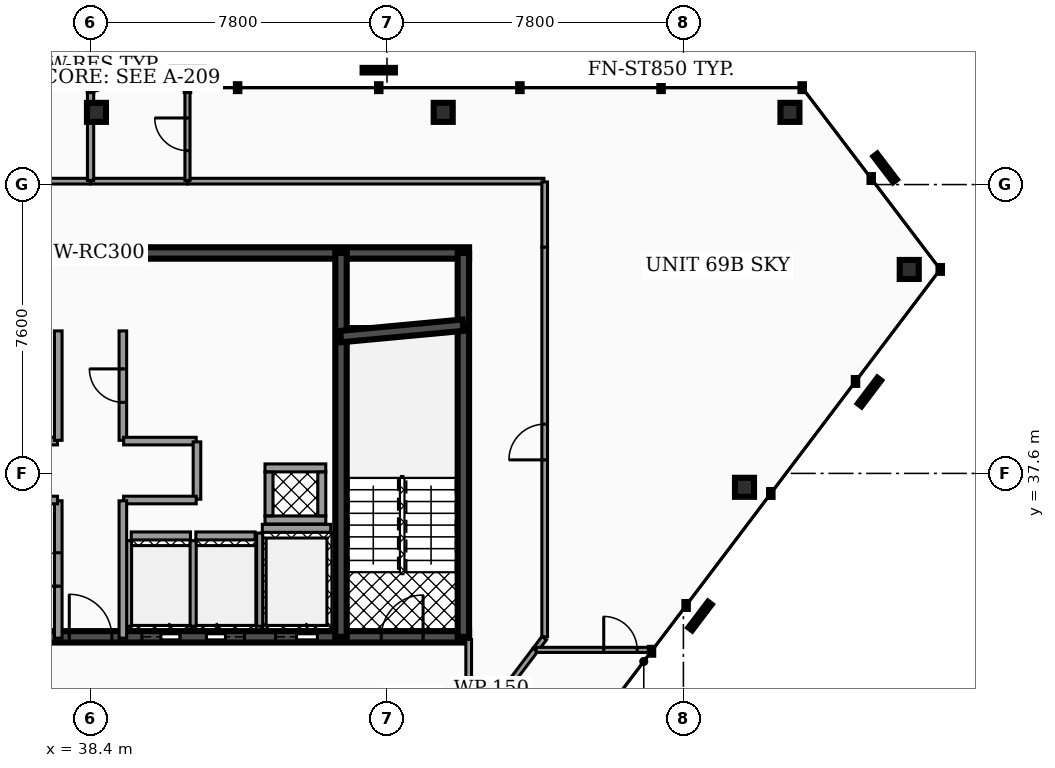
"""IFC4 building model, lengths in metres.
Left out: names, types, materials, properties, quantities, classifications, styles, units other than length and angle.
Written with IfcOpenShell. Run it as: python <this file> out.ifc"""

import sys

from ifc_helpers import new_model, si_unit, direction, frame, frame_2d, origin, origin_2d, place, context, subcontext, project, spatial, rectangle, hollow_rectangle, extrude, element, fill, save


model = new_model("IFC4")
c1 = context("Model", 3, precision=1e-05, world=origin(), true_north=direction((0.0, 1.0)))
c2 = subcontext(c1, "Body", "Model", "MODEL_VIEW")
j1 = project(units=[si_unit("LENGTHUNIT", "METRE"), si_unit("PLANEANGLEUNIT", "RADIAN")], contexts=[c1])
p1 = place(None, origin())
s1 = spatial("IfcSite", under=j1, at=p1, CompositionType="ELEMENT")
p2 = place(p1, origin())
s2 = spatial("IfcBuilding", under=s1, at=p2, CompositionType="ELEMENT")
p3 = place(p2, frame((0.0, 0.0, 272.0)))
s3 = spatial("IfcBuildingStorey", under=s2, at=p3, CompositionType="ELEMENT", Elevation=272.0)
p4 = place(p3, frame((28.5, 43.4, 0.0), z_axis=(0.0, 0.0, 1.0), x_axis=(1.0, 0.0, 0.0)))
e1 = element("IfcWall", 1, at=p4, inside=s3, PredefinedType="SHEAR", context=c2, shape_type="SweptSolid", body=[
    extrude(rectangle(XDim=19.86, YDim=0.3, at=frame_2d((9.93, 0.0))), origin(), (0.0, 0.0, 1.0), 3.18),
])
p5 = place(p3, frame((28.5, 33.3, 0.0), z_axis=(0.0, 0.0, 1.0), x_axis=(1.0, 0.0, 0.0)))
e2 = element("IfcWall", 2, at=p5, inside=s3, PredefinedType="SHEAR", context=c2, shape_type="SweptSolid", body=[
    extrude(rectangle(XDim=19.86, YDim=0.3, at=frame_2d((9.93, 0.0))), origin(), (0.0, 0.0, 1.0), 3.18),
])
p6 = place(p5, frame((3.93, 0.0, 0.0)))
e3 = element("IfcOpeningElement", 3, at=p6, cuts=e2, PredefinedType="OPENING", context=c2, shape_type="SweptSolid", body=[
    extrude(rectangle(XDim=1.1, YDim=2.15, at=frame_2d((0.55, 1.075))), frame((0.0, 0.16, 0.0), z_axis=(0.0, -1.0, 0.0), x_axis=(1.0, 0.0, 0.0)), (0.0, 0.0, 1.0), 0.32),
])
p7 = place(p5, frame((14.77, 0.0, 0.0)))
e4 = element("IfcOpeningElement", 4, at=p7, cuts=e2, PredefinedType="OPENING", context=c2, shape_type="SweptSolid", body=[
    extrude(rectangle(XDim=1.1, YDim=2.15, at=frame_2d((0.55, 1.075))), frame((0.0, 0.16, 0.0), z_axis=(0.0, -1.0, 0.0), x_axis=(1.0, 0.0, 0.0)), (0.0, 0.0, 1.0), 0.32),
])
p8 = place(p5, frame((11.25, 0.0, 0.0)))
e5 = element("IfcOpeningElement", 5, at=p8, cuts=e2, PredefinedType="OPENING", context=c2, shape_type="SweptSolid", body=[
    extrude(rectangle(XDim=1.0, YDim=2.1, at=frame_2d((0.5, 1.05))), frame((0.0, 0.16, 0.0), z_axis=(0.0, -1.0, 0.0), x_axis=(1.0, 0.0, 0.0)), (0.0, 0.0, 1.0), 0.32),
])
p9 = place(p5, frame((12.95, 0.0, 0.0)))
e6 = element("IfcOpeningElement", 6, at=p9, cuts=e2, PredefinedType="OPENING", context=c2, shape_type="SweptSolid", body=[
    extrude(rectangle(XDim=1.0, YDim=2.1, at=frame_2d((0.5, 1.05))), frame((0.0, 0.16, 0.0), z_axis=(0.0, -1.0, 0.0), x_axis=(1.0, 0.0, 0.0)), (0.0, 0.0, 1.0), 0.32),
])
p10 = place(p5, frame((5.85, 0.0, 0.0)))
e7 = element("IfcOpeningElement", 7, at=p10, cuts=e2, PredefinedType="OPENING", context=c2, shape_type="SweptSolid", body=[
    extrude(rectangle(XDim=1.0, YDim=2.1, at=frame_2d((0.5, 1.05))), frame((0.0, 0.16, 0.0), z_axis=(0.0, -1.0, 0.0), x_axis=(1.0, 0.0, 0.0)), (0.0, 0.0, 1.0), 0.32),
])
p11 = place(p5, frame((1.21, 0.0, 0.0)))
e8 = element("IfcOpeningElement", 8, at=p11, cuts=e2, PredefinedType="OPENING", context=c2, shape_type="SweptSolid", body=[
    extrude(rectangle(XDim=1.1, YDim=2.2, at=frame_2d((0.55, 1.1))), frame((0.0, 0.16, 0.0), z_axis=(0.0, -1.0, 0.0), x_axis=(1.0, 0.0, 0.0)), (0.0, 0.0, 1.0), 0.32),
])
p12 = place(p5, frame((9.34, 0.0, 0.0)))
e9 = element("IfcOpeningElement", 9, at=p12, cuts=e2, PredefinedType="OPENING", context=c2, shape_type="SweptSolid", body=[
    extrude(rectangle(XDim=1.12, YDim=2.05, at=frame_2d((0.56, 1.025))), frame((0.0, 0.16, 0.0), z_axis=(0.0, -1.0, 0.0), x_axis=(1.0, 0.0, 0.0)), (0.0, 0.0, 1.0), 0.32),
])
p13 = place(p5, frame((17.55, 0.0, 0.0)))
e10 = element("IfcOpeningElement", 10, at=p13, cuts=e2, PredefinedType="OPENING", context=c2, shape_type="SweptSolid", body=[
    extrude(rectangle(XDim=1.1, YDim=2.2, at=frame_2d((0.55, 1.1))), frame((0.0, 0.16, 0.0), z_axis=(0.0, -1.0, 0.0), x_axis=(1.0, 0.0, 0.0)), (0.0, 0.0, 1.0), 0.32),
])
for number, where, z_axis, x_axis in (
    (11, (44.99, 33.3, 0.0), (0.0, 0.0, 1.0), (0.0, 1.0, 0.0)),
    (12, (48.21, 33.3, 0.0), (0.0, 0.0, 1.0), (0.0, 1.0, 0.0)),
):
    element("IfcWall", number, at=place(p3, frame(where, z_axis=z_axis, x_axis=x_axis)), inside=s3, PredefinedType="SHEAR", context=c2, shape_type="SweptSolid", body=[
        extrude(rectangle(XDim=10.1, YDim=0.3, at=frame_2d((5.05, 0.0))), origin(), (0.0, 0.0, 1.0), 3.18),
    ])
p14 = place(p3, frame((44.98, 41.2, 0.0), z_axis=(0.0, 0.0, 1.0), x_axis=(0.995686468965, 0.09278176286, 0.0)))
e13 = element("IfcWall", 13, at=p14, inside=s3, PredefinedType="SHEAR", context=c2, shape_type="SweptSolid", body=[
    extrude(rectangle(XDim=3.234, YDim=0.3, at=frame_2d((1.617, 0.0))), origin(), (0.0, 0.0, 1.0), 3.18),
])
for number, where, z_axis, x_axis in (
    (14, (56.804, 47.1, 0.0), (0.0, 0.0, 1.0), (1.0, 0.0, 0.0)),
    (15, (47.679, 47.1, 0.0), (0.0, 0.0, 1.0), (1.0, 0.0, 0.0)),
    (16, (38.555, 47.1, 0.0), (0.0, 0.0, 1.0), (1.0, 0.0, 0.0)),
    (17, (55.608, 37.234, 0.0), (0.0, 0.0, 1.0), (1.0, 0.0, 0.0)),
    (18, (59.943, 42.967, 0.0), (0.0, 0.0, 1.0), (1.0, 0.0, 0.0)),
):
    element("IfcColumn", number, at=place(p3, frame(where, z_axis=z_axis, x_axis=x_axis)), inside=s3, PredefinedType="COLUMN", context=c2, shape_type="SweptSolid", body=[
        extrude(hollow_rectangle(XDim=0.5, YDim=0.5, WallThickness=0.025, at=origin_2d()), origin(), (0.0, 0.0, 1.0), 3.18),
    ])
p15 = place(p3, frame((42.92, 36.155, 0.0), z_axis=(0.0, 0.0, 1.0), x_axis=(1.0, 0.0, 0.0)))
e19 = element("IfcWall", 19, at=p15, inside=s3, PredefinedType="SOLIDWALL", context=c2, shape_type="SweptSolid", body=[
    extrude(rectangle(XDim=1.8, YDim=0.21, at=frame_2d((0.9, 0.0))), origin(), (0.0, 0.0, 1.0), 3.18),
])
p16 = place(p3, frame((42.85, 33.58, 0.0), z_axis=(0.0, 0.0, 1.0), x_axis=(0.0, 1.0, 0.0)))
e20 = element("IfcWall", 20, at=p16, inside=s3, PredefinedType="SOLIDWALL", context=c2, shape_type="SweptSolid", body=[
    extrude(rectangle(XDim=2.45, YDim=0.16, at=frame_2d((1.225, 0.0))), origin(), (0.0, 0.0, 1.0), 3.18),
])
p17 = place(p3, frame((39.47, 35.955, 0.0), z_axis=(0.0, 0.0, 1.0), x_axis=(1.0, 0.0, 0.0)))
e21 = element("IfcWall", 21, at=p17, inside=s3, PredefinedType="SOLIDWALL", context=c2, shape_type="SweptSolid", body=[
    extrude(rectangle(XDim=1.56, YDim=0.21, at=frame_2d((0.78, 0.0))), origin(), (0.0, 0.0, 1.0), 3.18),
])
for number, where, z_axis, x_axis in (
    (22, (39.4, 33.58, 0.0), (0.0, 0.0, 1.0), (0.0, 1.0, 0.0)),
    (23, (41.1, 33.58, 0.0), (0.0, 0.0, 1.0), (0.0, 1.0, 0.0)),
):
    element("IfcWall", number, at=place(p3, frame(where, z_axis=z_axis, x_axis=x_axis)), inside=s3, PredefinedType="SOLIDWALL", context=c2, shape_type="SweptSolid", body=[
        extrude(rectangle(XDim=2.25, YDim=0.16, at=frame_2d((1.125, 0.0))), origin(), (0.0, 0.0, 1.0), 3.18),
    ])
p18 = place(p3, frame((41.17, 35.955, 0.0), z_axis=(0.0, 0.0, 1.0), x_axis=(1.0, 0.0, 0.0)))
e24 = element("IfcWall", 24, at=p18, inside=s3, PredefinedType="SOLIDWALL", context=c2, shape_type="SweptSolid", body=[
    extrude(rectangle(XDim=1.56, YDim=0.21, at=frame_2d((0.78, 0.0))), origin(), (0.0, 0.0, 1.0), 3.18),
])
for number, where, z_axis, x_axis in (
    (25, (42.99, 36.375, 0.0), (0.0, 0.0, 1.0), (1.0, 0.0, 0.0)),
    (26, (42.99, 37.745, 0.0), (0.0, 0.0, 1.0), (1.0, 0.0, 0.0)),
):
    element("IfcWall", number, at=place(p3, frame(where, z_axis=z_axis, x_axis=x_axis)), inside=s3, PredefinedType="SOLIDWALL", context=c2, shape_type="SweptSolid", body=[
        extrude(rectangle(XDim=1.6, YDim=0.21, at=frame_2d((0.8, 0.0))), origin(), (0.0, 0.0, 1.0), 3.18),
    ])
for number, where, z_axis, x_axis in (
    (27, (43.095, 36.485, 0.0), (0.0, 0.0, 1.0), (0.0, 1.0, 0.0)),
    (28, (44.485, 36.485, 0.0), (0.0, 0.0, 1.0), (0.0, 1.0, 0.0)),
):
    element("IfcWall", number, at=place(p3, frame(where, z_axis=z_axis, x_axis=x_axis)), inside=s3, PredefinedType="SOLIDWALL", context=c2, shape_type="SweptSolid", body=[
        extrude(rectangle(XDim=1.15, YDim=0.21, at=frame_2d((0.575, 0.0))), origin(), (0.0, 0.0, 1.0), 3.18),
    ])
p19 = place(p3, frame((37.55, 33.265, 0.0), z_axis=(0.0, 0.0, 1.0), x_axis=(0.0, 1.0, 0.0)))
e29 = element("IfcWall", 29, at=p19, inside=s3, PredefinedType="PARTITIONING", context=c2, shape_type="SweptSolid", body=[
    extrude(rectangle(XDim=3.615, YDim=0.2, at=frame_2d((1.808, 0.0))), origin(), (0.0, 0.0, 1.0), 2.235),
])
p20 = place(p19, frame((1.367, 0.0, 0.0)))
e30 = element("IfcOpeningElement", 30, at=p20, cuts=e29, PredefinedType="OPENING", context=c2, shape_type="SweptSolid", body=[
    extrude(rectangle(XDim=0.88, YDim=2.05, at=frame_2d((0.44, 1.025))), frame((0.0, 0.11, 0.0), z_axis=(0.0, -1.0, 0.0), x_axis=(1.0, 0.0, 0.0)), (0.0, 0.0, 1.0), 0.22),
])
for number, where, z_axis, x_axis in (
    (31, (35.82, 36.9, 0.0), (0.0, 0.0, 1.0), (1.0, 0.0, 0.0)),
    (32, (35.82, 38.45, 0.0), (0.0, 0.0, 1.0), (1.0, 0.0, 0.0)),
):
    element("IfcWall", number, at=place(p3, frame(where, z_axis=z_axis, x_axis=x_axis)), inside=s3, PredefinedType="PARTITIONING", context=c2, shape_type="SweptSolid", body=[
        extrude(rectangle(XDim=1.71, YDim=0.2, at=frame_2d((0.855, 0.0))), origin(), (0.0, 0.0, 1.0), 2.235),
    ])
p21 = place(p3, frame((37.55, 38.47, 0.0), z_axis=(0.0, 0.0, 1.0), x_axis=(0.0, 1.0, 0.0)))
e33 = element("IfcWall", 33, at=p21, inside=s3, PredefinedType="PARTITIONING", context=c2, shape_type="SweptSolid", body=[
    extrude(rectangle(XDim=2.88, YDim=0.2, at=frame_2d((1.44, 0.0))), origin(), (0.0, 0.0, 1.0), 2.235),
])
p22 = place(p3, frame((39.25, 38.47, 0.0), z_axis=(0.0, 0.0, 1.0), x_axis=(0.0, 1.0, 0.0)))
e34 = element("IfcWall", 34, at=p22, inside=s3, PredefinedType="PARTITIONING", context=c2, shape_type="SweptSolid", body=[
    extrude(rectangle(XDim=2.88, YDim=0.2, at=frame_2d((1.44, 0.0))), origin(), (0.0, 0.0, 1.0), 2.235),
])
p23 = place(p22, frame((1.0, 0.0, 0.0)))
e35 = element("IfcOpeningElement", 35, at=p23, cuts=e34, PredefinedType="OPENING", context=c2, shape_type="SweptSolid", body=[
    extrude(rectangle(XDim=0.88, YDim=2.05, at=frame_2d((0.44, 1.025))), frame((0.0, 0.11, 0.0), z_axis=(0.0, -1.0, 0.0), x_axis=(1.0, 0.0, 0.0)), (0.0, 0.0, 1.0), 0.22),
])
p24 = place(p3, frame((39.27, 38.45, 0.0), z_axis=(0.0, 0.0, 1.0), x_axis=(1.0, 0.0, 0.0)))
e36 = element("IfcWall", 36, at=p24, inside=s3, PredefinedType="PARTITIONING", context=c2, shape_type="SweptSolid", body=[
    extrude(rectangle(XDim=1.91, YDim=0.2, at=frame_2d((0.955, 0.0))), origin(), (0.0, 0.0, 1.0), 2.235),
])
p25 = place(p3, frame((41.2, 36.92, 0.0), z_axis=(0.0, 0.0, 1.0), x_axis=(0.0, 1.0, 0.0)))
e37 = element("IfcWall", 37, at=p25, inside=s3, PredefinedType="PARTITIONING", context=c2, shape_type="SweptSolid", body=[
    extrude(rectangle(XDim=1.51, YDim=0.2, at=frame_2d((0.755, 0.0))), origin(), (0.0, 0.0, 1.0), 2.235),
])
p26 = place(p3, frame((39.27, 36.9, 0.0), z_axis=(0.0, 0.0, 1.0), x_axis=(1.0, 0.0, 0.0)))
e38 = element("IfcWall", 38, at=p26, inside=s3, PredefinedType="PARTITIONING", context=c2, shape_type="SweptSolid", body=[
    extrude(rectangle(XDim=1.91, YDim=0.2, at=frame_2d((0.955, 0.0))), origin(), (0.0, 0.0, 1.0), 2.235),
])
p27 = place(p3, frame((39.25, 33.265, 0.0), z_axis=(0.0, 0.0, 1.0), x_axis=(0.0, 1.0, 0.0)))
e39 = element("IfcWall", 39, at=p27, inside=s3, PredefinedType="PARTITIONING", context=c2, shape_type="SweptSolid", body=[
    extrude(rectangle(XDim=3.615, YDim=0.2, at=frame_2d((1.808, 0.0))), origin(), (0.0, 0.0, 1.0), 2.235),
])
p28 = place(p3, frame((48.35, 30.643, 0.0), z_axis=(0.0, 0.0, 1.0), x_axis=(0.0, 1.0, 0.0)))
e40 = element("IfcWall", 40, at=p28, inside=s3, PredefinedType="PARTITIONING", context=c2, shape_type="SweptSolid", body=[
    extrude(rectangle(XDim=2.587, YDim=0.15, at=frame_2d((1.294, 0.0))), origin(), (0.0, 0.0, 1.0), 2.235),
])
p29 = place(p3, frame((35.855, 45.29, 0.0), z_axis=(0.0, 0.0, 1.0), x_axis=(1.0, 0.0, 0.0)))
e41 = element("IfcWall", 41, at=p29, inside=s3, PredefinedType="PARTITIONING", context=c2, shape_type="SweptSolid", body=[
    extrude(rectangle(XDim=2.54, YDim=0.15, at=frame_2d((1.27, 0.0))), origin(), (0.0, 0.0, 1.0), 2.235),
])
p30 = place(p3, frame((40.955, 45.29, 0.0), z_axis=(0.0, 0.0, 1.0), x_axis=(1.0, 0.0, 0.0)))
e42 = element("IfcWall", 42, at=p30, inside=s3, PredefinedType="PARTITIONING", context=c2, shape_type="SweptSolid", body=[
    extrude(rectangle(XDim=9.375, YDim=0.15, at=frame_2d((4.688, 0.0))), origin(), (0.0, 0.0, 1.0), 2.235),
])
p31 = place(p3, frame((50.35, 43.55, 0.0), z_axis=(0.0, 0.0, 1.0), x_axis=(0.0, 1.0, 0.0)))
e43 = element("IfcWall", 43, at=p31, inside=s3, PredefinedType="PARTITIONING", context=c2, shape_type="SweptSolid", body=[
    extrude(rectangle(XDim=1.72, YDim=0.15, at=frame_2d((0.86, 0.0))), origin(), (0.0, 0.0, 1.0), 2.235),
])
p32 = place(p3, frame((50.35, 33.302, 0.0), z_axis=(0.0, 0.0, 1.0), x_axis=(0.0, 1.0, 0.0)))
e44 = element("IfcWall", 44, at=p32, inside=s3, PredefinedType="PARTITIONING", context=c2, shape_type="SweptSolid", body=[
    extrude(rectangle(XDim=10.248, YDim=0.15, at=frame_2d((5.124, 0.0))), origin(), (0.0, 0.0, 1.0), 2.235),
])
p33 = place(p32, frame((4.654, 0.0, 0.0)))
e45 = element("IfcOpeningElement", 45, at=p33, cuts=e44, PredefinedType="OPENING", context=c2, shape_type="SweptSolid", body=[
    extrude(rectangle(XDim=0.94, YDim=2.05, at=frame_2d((0.47, 1.025))), frame((0.0, 0.085, 0.0), z_axis=(0.0, -1.0, 0.0), x_axis=(1.0, 0.0, 0.0)), (0.0, 0.0, 1.0), 0.17),
])
p34 = place(p3, frame((50.107, 32.96, 0.0), z_axis=(0.0, 0.0, 1.0), x_axis=(0.602950173728, 0.797778846549, 0.0)))
e46 = element("IfcWall", 46, at=p34, inside=s3, PredefinedType="PARTITIONING", context=c2, shape_type="SweptSolid", body=[
    extrude(rectangle(XDim=0.384, YDim=0.15, at=frame_2d((0.192, 0.0))), origin(), (0.0, 0.0, 1.0), 2.235),
])
p35 = place(p3, frame((48.362, 30.654, 0.0), z_axis=(0.0, 0.0, 1.0), x_axis=(0.603189668488, 0.79759778324, 0.0)))
e47 = element("IfcWall", 47, at=p35, inside=s3, PredefinedType="PARTITIONING", context=c2, shape_type="SweptSolid", body=[
    extrude(rectangle(XDim=2.886, YDim=0.15, at=frame_2d((1.443, 0.0))), origin(), (0.0, 0.0, 1.0), 2.235),
])
p36 = place(p3, frame((38.405, 45.29, 0.0), z_axis=(0.0, 0.0, 1.0), x_axis=(1.0, 0.0, 0.0)))
e48 = element("IfcWall", 48, at=p36, inside=s3, PredefinedType="PARTITIONING", context=c2, shape_type="SweptSolid", body=[
    extrude(rectangle(XDim=2.54, YDim=0.15, at=frame_2d((1.27, 0.0))), origin(), (0.0, 0.0, 1.0), 2.235),
])
p37 = place(p3, frame((38.4, 45.31, 0.0), z_axis=(0.0, 0.0, 1.0), x_axis=(0.0, 1.0, 0.0)))
e49 = element("IfcWall", 49, at=p37, inside=s3, PredefinedType="PARTITIONING", context=c2, shape_type="SweptSolid", body=[
    extrude(rectangle(XDim=2.425, YDim=0.165, at=frame_2d((1.212, 0.0))), origin(), (0.0, 0.0, 1.0), 2.235),
])
p38 = place(p3, frame((50.124, 32.956, 0.0), z_axis=(0.0, 0.0, 1.0), x_axis=(1.0, 0.0, 0.0)))
e50 = element("IfcWall", 50, at=p38, inside=s3, PredefinedType="PARTITIONING", context=c2, shape_type="SweptSolid", body=[
    extrude(rectangle(XDim=3.049, YDim=0.135, at=frame_2d((1.525, 0.0))), origin(), (0.0, 0.0, 1.0), 2.235),
])
p39 = place(p38, frame((1.78, 0.0, 0.0)))
e51 = element("IfcOpeningElement", 51, at=p39, cuts=e50, PredefinedType="OPENING", context=c2, shape_type="SweptSolid", body=[
    extrude(rectangle(XDim=0.88, YDim=2.05, at=frame_2d((0.44, 1.025))), frame((0.0, 0.077, 0.0), z_axis=(0.0, -1.0, 0.0), x_axis=(1.0, 0.0, 0.0)), (0.0, 0.0, 1.0), 0.155),
])
p40 = place(p3, frame((40.95, 45.31, 0.0), z_axis=(0.0, 0.0, 1.0), x_axis=(0.0, 1.0, 0.0)))
e52 = element("IfcWall", 52, at=p40, inside=s3, PredefinedType="PARTITIONING", context=c2, shape_type="SweptSolid", body=[
    extrude(rectangle(XDim=2.425, YDim=0.135, at=frame_2d((1.212, 0.0))), origin(), (0.0, 0.0, 1.0), 2.235),
])
p41 = place(p40, frame((0.782, 0.0, 0.0)))
e53 = element("IfcOpeningElement", 53, at=p41, cuts=e52, PredefinedType="OPENING", context=c2, shape_type="SweptSolid", body=[
    extrude(rectangle(XDim=0.86, YDim=2.05, at=frame_2d((0.43, 1.025))), frame((0.0, 0.077, 0.0), z_axis=(0.0, -1.0, 0.0), x_axis=(1.0, 0.0, 0.0)), (0.0, 0.0, 1.0), 0.155),
])
p42 = place(p7, origin())
e54 = element("IfcDoor", 54, at=p42, inside=s3, OperationType="SLIDING_TO_RIGHT", PredefinedType="DOOR", context=c2, shape_type="SweptSolid", body=[
    extrude(rectangle(XDim=1.1, YDim=2.15, at=frame_2d((0.55, 1.075))), frame((0.0, 0.025, 0.0), z_axis=(0.0, -1.0, 0.0), x_axis=(1.0, 0.0, 0.0)), (0.0, 0.0, 1.0), 0.05),
])
fill(e4, e54)
p43 = place(p8, origin())
e55 = element("IfcDoor", 55, at=p43, inside=s3, OperationType="SLIDING_TO_RIGHT", PredefinedType="DOOR", context=c2, shape_type="SweptSolid", body=[
    extrude(rectangle(XDim=1.0, YDim=2.1, at=frame_2d((0.5, 1.05))), frame((0.0, 0.025, 0.0), z_axis=(0.0, -1.0, 0.0), x_axis=(1.0, 0.0, 0.0)), (0.0, 0.0, 1.0), 0.05),
])
fill(e5, e55)
p44 = place(p9, origin())
e56 = element("IfcDoor", 56, at=p44, inside=s3, OperationType="SLIDING_TO_LEFT", PredefinedType="DOOR", context=c2, shape_type="SweptSolid", body=[
    extrude(rectangle(XDim=1.0, YDim=2.1, at=frame_2d((0.5, 1.05))), frame((0.0, 0.025, 0.0), z_axis=(0.0, -1.0, 0.0), x_axis=(1.0, 0.0, 0.0)), (0.0, 0.0, 1.0), 0.05),
])
fill(e6, e56)
p45 = place(p12, origin())
e57 = element("IfcDoor", 57, at=p45, inside=s3, OperationType="SINGLE_SWING_LEFT", PredefinedType="DOOR", context=c2, shape_type="SweptSolid", body=[
    extrude(rectangle(XDim=1.12, YDim=2.05, at=frame_2d((0.56, 1.025))), frame((0.0, 0.025, 0.0), z_axis=(0.0, -1.0, 0.0), x_axis=(1.0, 0.0, 0.0)), (0.0, 0.0, 1.0), 0.05),
])
fill(e9, e57)
p46 = place(p13, origin())
e58 = element("IfcDoor", 58, at=p46, inside=s3, OperationType="SINGLE_SWING_RIGHT", PredefinedType="DOOR", context=c2, shape_type="SweptSolid", body=[
    extrude(rectangle(XDim=1.1, YDim=2.2, at=frame_2d((0.55, 1.1))), frame((0.0, 0.025, 0.0), z_axis=(0.0, -1.0, 0.0), x_axis=(1.0, 0.0, 0.0)), (0.0, 0.0, 1.0), 0.05),
])
fill(e10, e58)
p47 = place(p20, origin())
e59 = element("IfcDoor", 59, at=p47, inside=s3, OperationType="SINGLE_SWING_LEFT", PredefinedType="DOOR", context=c2, shape_type="SweptSolid", body=[
    extrude(rectangle(XDim=0.88, YDim=2.05, at=frame_2d((0.44, 1.025))), frame((0.0, 0.025, 0.0), z_axis=(0.0, -1.0, 0.0), x_axis=(1.0, 0.0, 0.0)), (0.0, 0.0, 1.0), 0.05),
])
fill(e30, e59)
p48 = place(p23, origin())
e60 = element("IfcDoor", 60, at=p48, inside=s3, OperationType="SINGLE_SWING_RIGHT", PredefinedType="DOOR", context=c2, shape_type="SweptSolid", body=[
    extrude(rectangle(XDim=0.88, YDim=2.05, at=frame_2d((0.44, 1.025))), frame((0.0, 0.025, 0.0), z_axis=(0.0, -1.0, 0.0), x_axis=(1.0, 0.0, 0.0)), (0.0, 0.0, 1.0), 0.05),
])
fill(e35, e60)
p49 = place(p33, origin())
e61 = element("IfcDoor", 61, at=p49, inside=s3, OperationType="SINGLE_SWING_LEFT", PredefinedType="DOOR", context=c2, shape_type="SweptSolid", body=[
    extrude(rectangle(XDim=0.94, YDim=2.05, at=frame_2d((0.47, 1.025))), frame((0.0, 0.025, 0.0), z_axis=(0.0, -1.0, 0.0), x_axis=(1.0, 0.0, 0.0)), (0.0, 0.0, 1.0), 0.05),
])
fill(e45, e61)
p50 = place(p39, origin())
e62 = element("IfcDoor", 62, at=p50, inside=s3, OperationType="SINGLE_SWING_LEFT", PredefinedType="DOOR", context=c2, shape_type="SweptSolid", body=[
    extrude(rectangle(XDim=0.88, YDim=2.05, at=frame_2d((0.44, 1.025))), frame((0.0, 0.025, 0.0), z_axis=(0.0, -1.0, 0.0), x_axis=(1.0, 0.0, 0.0)), (0.0, 0.0, 1.0), 0.05),
])
fill(e51, e62)
p51 = place(p41, origin())
e63 = element("IfcDoor", 63, at=p51, inside=s3, OperationType="SINGLE_SWING_RIGHT", PredefinedType="DOOR", context=c2, shape_type="SweptSolid", body=[
    extrude(rectangle(XDim=0.86, YDim=2.05, at=frame_2d((0.43, 1.025))), frame((0.0, 0.025, 0.0), z_axis=(0.0, -1.0, 0.0), x_axis=(1.0, 0.0, 0.0)), (0.0, 0.0, 1.0), 0.05),
])
fill(e53, e63)
save(model, sys.argv[1])
